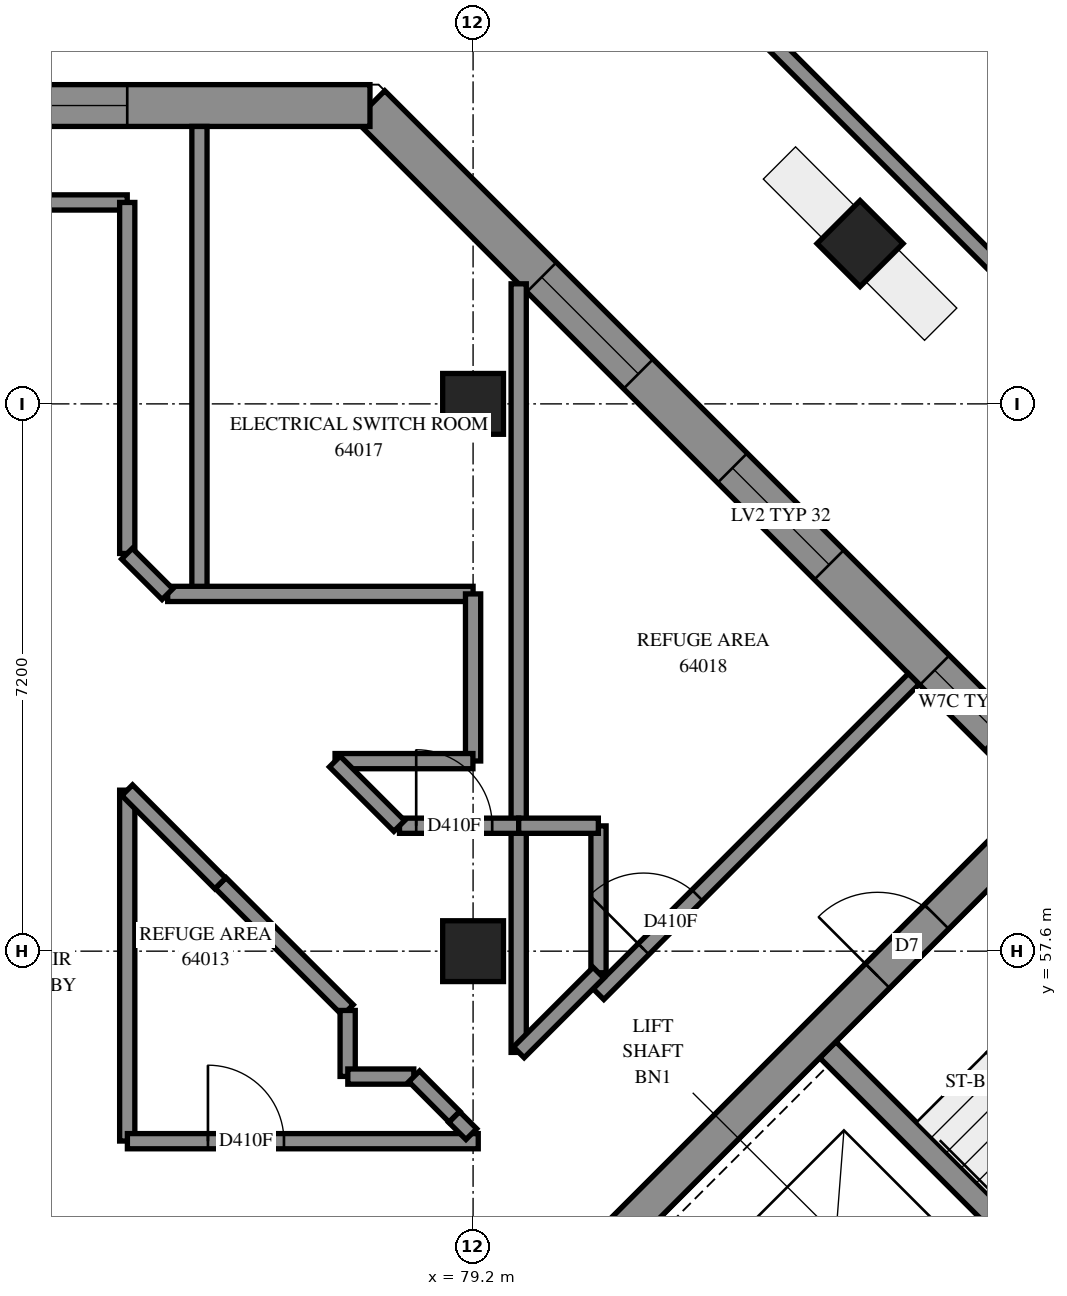
"""IFC4 building model, lengths in metres.
Left out: names, types, materials, properties, quantities, classifications, styles, units other than length and angle.
Written with IfcOpenShell. Run it as: python <this file> out.ifc"""

import sys

from ifc_helpers import new_model, si_unit, direction, frame, frame_2d, origin, origin_2d, place, context, subcontext, project, spatial, polyline, rectangle, outline, extrude, element, fill, save


model = new_model("IFC4")
c1 = context("Model", 3, precision=1e-05, world=origin(), true_north=direction((0.0, 1.0)))
c2 = subcontext(c1, "Body", "Model", "MODEL_VIEW")
j1 = project(units=[si_unit("LENGTHUNIT", "METRE"), si_unit("PLANEANGLEUNIT", "RADIAN")], contexts=[c1])
p1 = place(None, origin())
s1 = spatial("IfcSite", under=j1, at=p1, CompositionType="ELEMENT")
p2 = place(p1, origin())
s2 = spatial("IfcBuilding", under=s1, at=p2, CompositionType="ELEMENT")
p3 = place(p2, frame((0.0, 0.0, 234.6)))
s3 = spatial("IfcBuildingStorey", under=s2, at=p3, CompositionType="ELEMENT", Elevation=234.6)
for number, where, z_axis, x_axis in (
    (1, (79.2, 57.6, 0.0), (0.0, 0.0, 1.0), (1.0, 0.0, 0.0)),
    (2, (79.2, 64.8, 0.0), (0.0, 0.0, 1.0), (1.0, 0.0, 0.0)),
):
    element("IfcColumn", number, at=place(p3, frame(where, z_axis=z_axis, x_axis=x_axis)), inside=s3, PredefinedType="COLUMN", context=c2, shape_type="SweptSolid", body=[
        extrude(rectangle(XDim=0.8, YDim=0.8, at=origin_2d()), origin(), (0.0, 0.0, 1.0), 4.7),
    ])
p4 = place(p3, frame((84.291, 66.909, -0.3), z_axis=(0.0, 0.0, 1.0), x_axis=(0.7071067812, -0.7071067812, 0.0)))
e3 = element("IfcColumn", 3, at=p4, inside=s3, PredefinedType="COLUMN", context=c2, shape_type="SweptSolid", body=[
    extrude(rectangle(XDim=0.8, YDim=0.8, at=origin_2d()), origin(), (0.0, 0.0, 1.0), 5.0),
])
p5 = place(p3, frame((76.495, 49.249, -0.3), z_axis=(0.0, 0.0, 1.0), x_axis=(0.7071067812, 0.7071067812, 0.0)))
e4 = element("IfcWall", 4, at=p5, inside=s3, PredefinedType="SHEAR", context=c2, shape_type="SweptSolid", body=[
    extrude(rectangle(XDim=14.4, YDim=0.45, at=frame_2d((7.2, 0.0))), origin(), (0.0, 0.0, 1.0), 4.3),
])
p6 = place(p5, frame((4.55, 0.0, 0.3)))
e5 = element("IfcOpeningElement", 5, at=p6, cuts=e4, PredefinedType="OPENING", context=c2, shape_type="SweptSolid", body=[
    extrude(rectangle(XDim=1.1, YDim=2.1, at=frame_2d((0.55, 1.05))), frame((0.0, 0.235, 0.0), z_axis=(0.0, -1.0, 0.0), x_axis=(1.0, 0.0, 0.0)), (0.0, 0.0, 1.0), 0.47),
])
p7 = place(p5, frame((11.35, 0.0, 0.3)))
e6 = element("IfcOpeningElement", 6, at=p7, cuts=e4, PredefinedType="OPENING", context=c2, shape_type="SweptSolid", body=[
    extrude(rectangle(XDim=1.1, YDim=2.1, at=frame_2d((0.55, 1.05))), frame((0.0, 0.235, 0.0), z_axis=(0.0, -1.0, 0.0), x_axis=(1.0, 0.0, 0.0)), (0.0, 0.0, 1.0), 0.47),
])
p8 = place(p3, frame((83.867, 56.302, 0.0), z_axis=(0.0, 0.0, 1.0), x_axis=(0.7071137256, -0.7070998367, 0.0)))
e7 = element("IfcWall", 7, at=p8, inside=s3, PredefinedType="SOLIDWALL", context=c2, shape_type="SweptSolid", body=[
    extrude(rectangle(XDim=7.2, YDim=0.3, at=frame_2d((3.6, 0.0))), origin(), (0.0, 0.0, 1.0), 4.7),
])
p9 = place(p3, frame((86.748, 59.82, 0.0), z_axis=(0.0, 0.0, 1.0), x_axis=(-0.7071067812, 0.7071067812, 0.0)))
e8 = element("IfcWall", 8, at=p9, inside=s3, PredefinedType="SOLIDWALL", context=c2, shape_type="SweptSolid", body=[
    extrude(outline(polyline([(0.0, -0.275), (12.707, -0.275), (12.479, 0.275), (0.0, 0.275), (0.0, -0.275)])), origin(), (0.0, 0.0, 1.0), 4.7),
])
p10 = place(p9, frame((4.05, 0.0, 0.9)))
e9 = element("IfcOpeningElement", 9, at=p10, cuts=e8, PredefinedType="OPENING", context=c2, shape_type="SweptSolid", body=[
    extrude(rectangle(XDim=1.8, YDim=3.6, at=frame_2d((0.9, 1.8))), frame((0.0, 0.285, 0.0), z_axis=(0.0, -1.0, 0.0), x_axis=(1.0, 0.0, 0.0)), (0.0, 0.0, 1.0), 0.57),
])
p11 = place(p9, frame((7.6, 0.0, 0.9)))
e10 = element("IfcOpeningElement", 10, at=p11, cuts=e8, PredefinedType="OPENING", context=c2, shape_type="SweptSolid", body=[
    extrude(rectangle(XDim=1.8, YDim=3.6, at=frame_2d((0.9, 1.8))), frame((0.0, 0.285, 0.0), z_axis=(0.0, -1.0, 0.0), x_axis=(1.0, 0.0, 0.0)), (0.0, 0.0, 1.0), 0.57),
])
p12 = place(p9, frame((0.888, 0.0, 0.7)))
e11 = element("IfcOpeningElement", 11, at=p12, cuts=e8, PredefinedType="OPENING", context=c2, shape_type="SweptSolid", body=[
    extrude(rectangle(XDim=1.2, YDim=2.3, at=frame_2d((0.6, 1.15))), frame((0.0, 0.285, 0.0), z_axis=(0.0, -1.0, 0.0), x_axis=(1.0, 0.0, 0.0)), (0.0, 0.0, 1.0), 0.57),
])
p13 = place(p3, frame((77.844, 68.725, 0.0), z_axis=(0.0, 0.0, 1.0), x_axis=(-1.0, 0.0, 0.0)))
e12 = element("IfcWall", 12, at=p13, inside=s3, PredefinedType="SOLIDWALL", context=c2, shape_type="SweptSolid", body=[
    extrude(outline(polyline([(-0.114, -0.275), (46.044, -0.275), (45.493, 0.275), (0.114, 0.275), (-0.114, -0.275)])), origin(), (0.0, 0.0, 1.0), 4.7),
])
p14 = place(p13, frame((3.193, 0.0, 0.9)))
e13 = element("IfcOpeningElement", 13, at=p14, cuts=e12, PredefinedType="OPENING", context=c2, shape_type="SweptSolid", body=[
    extrude(rectangle(XDim=1.8, YDim=3.6, at=frame_2d((0.9, 1.8))), frame((0.0, 0.285, 0.0), z_axis=(0.0, -1.0, 0.0), x_axis=(1.0, 0.0, 0.0)), (0.0, 0.0, 1.0), 0.57),
])
p15 = place(p13, frame((6.744, 0.0, 0.9)))
e14 = element("IfcOpeningElement", 14, at=p15, cuts=e12, PredefinedType="OPENING", context=c2, shape_type="SweptSolid", body=[
    extrude(rectangle(XDim=1.8, YDim=3.6, at=frame_2d((0.9, 1.8))), frame((0.0, 0.285, 0.0), z_axis=(0.0, -1.0, 0.0), x_axis=(1.0, 0.0, 0.0)), (0.0, 0.0, 1.0), 0.57),
])
p16 = place(p13, frame((10.344, 0.0, 0.9)))
e15 = element("IfcOpeningElement", 15, at=p16, cuts=e12, PredefinedType="OPENING", context=c2, shape_type="SweptSolid", body=[
    extrude(rectangle(XDim=1.8, YDim=3.6, at=frame_2d((0.9, 1.8))), frame((0.0, 0.285, 0.0), z_axis=(0.0, -1.0, 0.0), x_axis=(1.0, 0.0, 0.0)), (0.0, 0.0, 1.0), 0.57),
])
p17 = place(p13, frame((13.944, 0.0, 0.9)))
e16 = element("IfcOpeningElement", 16, at=p17, cuts=e12, PredefinedType="OPENING", context=c2, shape_type="SweptSolid", body=[
    extrude(rectangle(XDim=1.8, YDim=3.6, at=frame_2d((0.9, 1.8))), frame((0.0, 0.285, 0.0), z_axis=(0.0, -1.0, 0.0), x_axis=(1.0, 0.0, 0.0)), (0.0, 0.0, 1.0), 0.57),
])
p18 = place(p13, frame((17.544, 0.0, 0.9)))
e17 = element("IfcOpeningElement", 17, at=p18, cuts=e12, PredefinedType="OPENING", context=c2, shape_type="SweptSolid", body=[
    extrude(rectangle(XDim=1.8, YDim=3.6, at=frame_2d((0.9, 1.8))), frame((0.0, 0.285, 0.0), z_axis=(0.0, -1.0, 0.0), x_axis=(1.0, 0.0, 0.0)), (0.0, 0.0, 1.0), 0.57),
])
p19 = place(p13, frame((21.143, 0.0, 0.9)))
e18 = element("IfcOpeningElement", 18, at=p19, cuts=e12, PredefinedType="OPENING", context=c2, shape_type="SweptSolid", body=[
    extrude(rectangle(XDim=1.8, YDim=3.6, at=frame_2d((0.9, 1.8))), frame((0.0, 0.285, 0.0), z_axis=(0.0, -1.0, 0.0), x_axis=(1.0, 0.0, 0.0)), (0.0, 0.0, 1.0), 0.57),
])
p20 = place(p13, frame((24.744, 0.0, 0.9)))
e19 = element("IfcOpeningElement", 19, at=p20, cuts=e12, PredefinedType="OPENING", context=c2, shape_type="SweptSolid", body=[
    extrude(rectangle(XDim=1.8, YDim=3.6, at=frame_2d((0.9, 1.8))), frame((0.0, 0.285, 0.0), z_axis=(0.0, -1.0, 0.0), x_axis=(1.0, 0.0, 0.0)), (0.0, 0.0, 1.0), 0.57),
])
p21 = place(p13, frame((28.343, 0.0, 0.9)))
e20 = element("IfcOpeningElement", 20, at=p21, cuts=e12, PredefinedType="OPENING", context=c2, shape_type="SweptSolid", body=[
    extrude(rectangle(XDim=1.8, YDim=3.6, at=frame_2d((0.9, 1.8))), frame((0.0, 0.285, 0.0), z_axis=(0.0, -1.0, 0.0), x_axis=(1.0, 0.0, 0.0)), (0.0, 0.0, 1.0), 0.57),
])
p22 = place(p13, frame((31.944, 0.0, 0.9)))
e21 = element("IfcOpeningElement", 21, at=p22, cuts=e12, PredefinedType="OPENING", context=c2, shape_type="SweptSolid", body=[
    extrude(rectangle(XDim=1.8, YDim=3.6, at=frame_2d((0.9, 1.8))), frame((0.0, 0.285, 0.0), z_axis=(0.0, -1.0, 0.0), x_axis=(1.0, 0.0, 0.0)), (0.0, 0.0, 1.0), 0.57),
])
p23 = place(p13, frame((35.544, 0.0, 0.9)))
e22 = element("IfcOpeningElement", 22, at=p23, cuts=e12, PredefinedType="OPENING", context=c2, shape_type="SweptSolid", body=[
    extrude(rectangle(XDim=1.8, YDim=3.6, at=frame_2d((0.9, 1.8))), frame((0.0, 0.285, 0.0), z_axis=(0.0, -1.0, 0.0), x_axis=(1.0, 0.0, 0.0)), (0.0, 0.0, 1.0), 0.57),
])
p24 = place(p3, frame((102.747, 49.938, 0.0), z_axis=(0.0, 0.0, 1.0), x_axis=(-0.7071083109, 0.7071052514, 0.0)))
e23 = element("IfcWall", 23, at=p24, inside=s3, PredefinedType="SOLIDWALL", context=c2, shape_type="SweptSolid", body=[
    extrude(outline(polyline([(-0.1, -0.1), (32.726, -0.1), (32.644, 0.1), (0.1, 0.1), (-0.1, -0.1)])), origin(), (0.0, 0.0, 1.0), 4.7),
])
p25 = place(p3, frame((54.95, 67.45, 0.0), z_axis=(0.0, 0.0, 1.0), x_axis=(1.0, 0.0, 0.0)))
e24 = element("IfcWall", 24, at=p25, inside=s3, PredefinedType="PARTITIONING", context=c2, shape_type="SweptSolid", body=[
    extrude(rectangle(XDim=19.7, YDim=0.2, at=frame_2d((9.85, 0.0))), origin(), (0.0, 0.0, 1.0), 4.7),
])
p26 = place(p3, frame((79.8, 59.25, 0.0), z_axis=(0.0, 0.0, 1.0), x_axis=(0.0, 1.0, 0.0)))
e25 = element("IfcWall", 25, at=p26, inside=s3, PredefinedType="PARTITIONING", context=c2, shape_type="SweptSolid", body=[
    extrude(rectangle(XDim=7.13, YDim=0.2, at=frame_2d((3.565, 0.0))), origin(), (0.0, 0.0, 1.0), 4.7),
])
p27 = place(p3, frame((75.6, 62.3, 0.0), z_axis=(0.0, 0.0, 1.0), x_axis=(0.0, 1.0, 0.0)))
e26 = element("IfcWall", 26, at=p27, inside=s3, PredefinedType="PARTITIONING", context=c2, shape_type="SweptSolid", body=[
    extrude(rectangle(XDim=6.15, YDim=0.2, at=frame_2d((3.075, 0.0))), origin(), (0.0, 0.0, 1.0), 4.7),
])
p28 = place(p3, frame((80.85, 57.034, 0.0), z_axis=(0.0, 0.0, 1.0), x_axis=(0.7071067812, 0.7071067812, 0.0)))
e27 = element("IfcWall", 27, at=p28, inside=s3, PredefinedType="PARTITIONING", context=c2, shape_type="SweptSolid", body=[
    extrude(rectangle(XDim=5.866, YDim=0.2, at=frame_2d((2.933, 0.0))), origin(), (0.0, 0.0, 1.0), 4.7),
])
p29 = place(p28, frame((0.839, 0.0, 0.0)))
e28 = element("IfcOpeningElement", 28, at=p29, cuts=e27, PredefinedType="OPENING", context=c2, shape_type="SweptSolid", body=[
    extrude(rectangle(XDim=1.0, YDim=2.1, at=frame_2d((0.5, 1.05))), frame((0.0, 0.11, 0.0), z_axis=(0.0, -1.0, 0.0), x_axis=(1.0, 0.0, 0.0)), (0.0, 0.0, 1.0), 0.22),
])
p30 = place(p3, frame((74.65, 62.832, 0.0), z_axis=(0.0, 0.0, 1.0), x_axis=(0.0, 1.0, 0.0)))
e29 = element("IfcWall", 29, at=p30, inside=s3, PredefinedType="PARTITIONING", context=c2, shape_type="SweptSolid", body=[
    extrude(rectangle(XDim=4.618, YDim=0.2, at=frame_2d((2.309, 0.0))), origin(), (0.0, 0.0, 1.0), 4.7),
])
p31 = place(p3, frame((74.65, 55.102, 0.0), z_axis=(0.0, 0.0, 1.0), x_axis=(0.0, 1.0, 0.0)))
e30 = element("IfcWall", 30, at=p31, inside=s3, PredefinedType="PARTITIONING", context=c2, shape_type="SweptSolid", body=[
    extrude(rectangle(XDim=4.616, YDim=0.2, at=frame_2d((2.308, 0.0))), origin(), (0.0, 0.0, 1.0), 4.7),
])
p32 = place(p3, frame((74.652, 55.1, 0.0), z_axis=(0.0, 0.0, 1.0), x_axis=(1.0, 0.0, 0.0)))
e31 = element("IfcWall", 31, at=p32, inside=s3, PredefinedType="PARTITIONING", context=c2, shape_type="SweptSolid", body=[
    extrude(rectangle(XDim=4.616, YDim=0.2, at=frame_2d((2.308, 0.0))), origin(), (0.0, 0.0, 1.0), 4.7),
])
p33 = place(p32, frame((1.06, 0.0, 0.0)))
e32 = element("IfcOpeningElement", 32, at=p33, cuts=e31, PredefinedType="OPENING", context=c2, shape_type="SweptSolid", body=[
    extrude(rectangle(XDim=1.0, YDim=2.1, at=frame_2d((0.5, 1.05))), frame((0.0, 0.11, 0.0), z_axis=(0.0, -1.0, 0.0), x_axis=(1.0, 0.0, 0.0)), (0.0, 0.0, 1.0), 0.22),
])
p34 = place(p3, frame((75.182, 62.3, 0.0), z_axis=(0.0, 0.0, 1.0), x_axis=(1.0, 0.0, 0.0)))
e33 = element("IfcWall", 33, at=p34, inside=s3, PredefinedType="PARTITIONING", context=c2, shape_type="SweptSolid", body=[
    extrude(rectangle(XDim=4.018, YDim=0.2, at=frame_2d((2.009, 0.0))), origin(), (0.0, 0.0, 1.0), 4.7),
])
p35 = place(p3, frame((79.8, 56.268, 0.0), z_axis=(0.0, 0.0, 1.0), x_axis=(0.0, 1.0, 0.0)))
e34 = element("IfcWall", 34, at=p35, inside=s3, PredefinedType="PARTITIONING", context=c2, shape_type="SweptSolid", body=[
    extrude(rectangle(XDim=2.982, YDim=0.2, at=frame_2d((1.491, 0.0))), origin(), (0.0, 0.0, 1.0), 4.7),
])
p36 = place(p3, frame((75.878, 58.496, 0.0), z_axis=(0.0, 0.0, 1.0), x_axis=(0.7075293128, -0.706683997, 0.0)))
e35 = element("IfcWall", 35, at=p36, inside=s3, PredefinedType="PARTITIONING", context=c2, shape_type="SweptSolid", body=[
    extrude(rectangle(XDim=2.366, YDim=0.2, at=frame_2d((1.183, 0.0))), origin(), (0.0, 0.0, 1.0), 4.7),
])
p37 = place(p3, frame((79.2, 60.102, 0.0), z_axis=(0.0, 0.0, 1.0), x_axis=(0.0, 1.0, 0.0)))
e36 = element("IfcWall", 36, at=p37, inside=s3, PredefinedType="PARTITIONING", context=c2, shape_type="SweptSolid", body=[
    extrude(rectangle(XDim=2.198, YDim=0.2, at=frame_2d((1.099, 0.0))), origin(), (0.0, 0.0, 1.0), 4.7),
])
p38 = place(p3, frame((80.85, 57.316, 0.0), z_axis=(0.0, 0.0, 1.0), x_axis=(0.0, 1.0, 0.0)))
e37 = element("IfcWall", 37, at=p38, inside=s3, PredefinedType="PARTITIONING", context=c2, shape_type="SweptSolid", body=[
    extrude(rectangle(XDim=1.932, YDim=0.2, at=frame_2d((0.966, 0.0))), origin(), (0.0, 0.0, 1.0), 4.7),
])
p39 = place(p3, frame((77.384, 60.1, 0.0), z_axis=(0.0, 0.0, 1.0), x_axis=(1.0, 0.0, 0.0)))
e38 = element("IfcWall", 38, at=p39, inside=s3, PredefinedType="PARTITIONING", context=c2, shape_type="SweptSolid", body=[
    extrude(rectangle(XDim=1.814, YDim=0.2, at=frame_2d((0.907, 0.0))), origin(), (0.0, 0.0, 1.0), 4.7),
])
p40 = place(p3, frame((74.649, 59.717, 0.0), z_axis=(0.0, 0.0, 1.0), x_axis=(0.7065293157, -0.7076837754, 0.0)))
e39 = element("IfcWall", 39, at=p40, inside=s3, PredefinedType="PARTITIONING", context=c2, shape_type="SweptSolid", body=[
    extrude(rectangle(XDim=1.732, YDim=0.2, at=frame_2d((0.866, 0.0))), origin(), (0.0, 0.0, 1.0), 4.7),
])
p41 = place(p3, frame((78.232, 59.25, 0.0), z_axis=(0.0, 0.0, 1.0), x_axis=(1.0, 0.0, 0.0)))
e40 = element("IfcWall", 40, at=p41, inside=s3, PredefinedType="PARTITIONING", context=c2, shape_type="SweptSolid", body=[
    extrude(rectangle(XDim=1.568, YDim=0.2, at=frame_2d((0.784, 0.0))), origin(), (0.0, 0.0, 1.0), 4.7),
])
p42 = place(p41, frame((0.22, 0.0, 0.0)))
e41 = element("IfcOpeningElement", 41, at=p42, cuts=e40, PredefinedType="OPENING", context=c2, shape_type="SweptSolid", body=[
    extrude(rectangle(XDim=1.0, YDim=2.1, at=frame_2d((0.5, 1.05))), frame((0.0, 0.11, 0.0), z_axis=(0.0, -1.0, 0.0), x_axis=(1.0, 0.0, 0.0)), (0.0, 0.0, 1.0), 0.22),
])
p43 = place(p3, frame((79.801, 56.269, 0.0), z_axis=(0.0, 0.0, 1.0), x_axis=(0.7071067812, 0.7071067812, 0.0)))
e42 = element("IfcWall", 42, at=p43, inside=s3, PredefinedType="PARTITIONING", context=c2, shape_type="SweptSolid", body=[
    extrude(rectangle(XDim=1.482, YDim=0.2, at=frame_2d((0.741, 0.0))), origin(), (0.0, 0.0, 1.0), 4.7),
])
p44 = place(p3, frame((77.381, 60.095, 0.0), z_axis=(0.0, 0.0, 1.0), x_axis=(0.7071067812, -0.7071067812, 0.0)))
e43 = element("IfcWall", 43, at=p44, inside=s3, PredefinedType="PARTITIONING", context=c2, shape_type="SweptSolid", body=[
    extrude(rectangle(XDim=1.199, YDim=0.2, at=frame_2d((0.6, 0.0))), origin(), (0.0, 0.0, 1.0), 4.7),
])
p45 = place(p3, frame((79.8, 59.25, 0.0), z_axis=(0.0, 0.0, 1.0), x_axis=(1.0, 0.0, 0.0)))
e44 = element("IfcWall", 44, at=p45, inside=s3, PredefinedType="PARTITIONING", context=c2, shape_type="SweptSolid", body=[
    extrude(rectangle(XDim=1.048, YDim=0.2, at=frame_2d((0.524, 0.0))), origin(), (0.0, 0.0, 1.0), 4.7),
])
for number, where, z_axis, x_axis in (
    (45, (77.55, 55.952, 0.0), (0.0, 0.0, 1.0), (0.0, 1.0, 0.0)),
    (46, (77.552, 55.95, 0.0), (0.0, 0.0, 1.0), (1.0, 0.0, 0.0)),
):
    element("IfcWall", number, at=place(p3, frame(where, z_axis=z_axis, x_axis=x_axis)), inside=s3, PredefinedType="PARTITIONING", context=c2, shape_type="SweptSolid", body=[
        extrude(rectangle(XDim=0.868, YDim=0.2, at=frame_2d((0.434, 0.0))), origin(), (0.0, 0.0, 1.0), 4.7),
    ])
p46 = place(p3, frame((74.647, 62.829, 0.0), z_axis=(0.0, 0.0, 1.0), x_axis=(0.7071067812, -0.7071067812, 0.0)))
e47 = element("IfcWall", 47, at=p46, inside=s3, PredefinedType="PARTITIONING", context=c2, shape_type="SweptSolid", body=[
    extrude(rectangle(XDim=0.752, YDim=0.2, at=frame_2d((0.376, 0.0))), origin(), (0.0, 0.0, 1.0), 4.7),
])
p47 = place(p3, frame((78.425, 55.953, 0.0), z_axis=(0.0, 0.0, 1.0), x_axis=(0.7057738785, -0.7084371761, 0.0)))
e48 = element("IfcWall", 48, at=p47, inside=s3, PredefinedType="PARTITIONING", context=c2, shape_type="SweptSolid", body=[
    extrude(rectangle(XDim=0.751, YDim=0.2, at=frame_2d((0.376, 0.0))), origin(), (0.0, 0.0, 1.0), 4.7),
])
p48 = place(p3, frame((78.951, 55.417, 0.0), z_axis=(0.0, 0.0, 1.0), x_axis=(0.709302262, -0.7049044624, 0.0)))
e49 = element("IfcWall", 49, at=p48, inside=s3, PredefinedType="PARTITIONING", context=c2, shape_type="SweptSolid", body=[
    extrude(rectangle(XDim=0.318, YDim=0.2, at=frame_2d((0.159, 0.0))), origin(), (0.0, 0.0, 1.0), 4.7),
])
p49 = place(p10, origin())
e50 = element("IfcWindow", 50, at=p49, inside=s3, PartitioningType="SINGLE_PANEL", PredefinedType="WINDOW", context=c2, shape_type="SweptSolid", body=[
    extrude(rectangle(XDim=1.8, YDim=3.6, at=frame_2d((0.9, 1.8))), frame((0.0, 0.155, 0.0), z_axis=(0.0, -1.0, 0.0), x_axis=(1.0, 0.0, 0.0)), (0.0, 0.0, 1.0), 0.06),
])
fill(e9, e50)
p50 = place(p11, origin())
e51 = element("IfcWindow", 51, at=p50, inside=s3, PartitioningType="SINGLE_PANEL", PredefinedType="WINDOW", context=c2, shape_type="SweptSolid", body=[
    extrude(rectangle(XDim=1.8, YDim=3.6, at=frame_2d((0.9, 1.8))), frame((0.0, 0.155, 0.0), z_axis=(0.0, -1.0, 0.0), x_axis=(1.0, 0.0, 0.0)), (0.0, 0.0, 1.0), 0.06),
])
fill(e10, e51)
p51 = place(p14, origin())
e52 = element("IfcWindow", 52, at=p51, inside=s3, PartitioningType="SINGLE_PANEL", PredefinedType="WINDOW", context=c2, shape_type="SweptSolid", body=[
    extrude(rectangle(XDim=1.8, YDim=3.6, at=frame_2d((0.9, 1.8))), frame((0.0, 0.155, 0.0), z_axis=(0.0, -1.0, 0.0), x_axis=(1.0, 0.0, 0.0)), (0.0, 0.0, 1.0), 0.06),
])
fill(e13, e52)
p52 = place(p7, origin())
e53 = element("IfcDoor", 53, at=p52, inside=s3, OperationType="SINGLE_SWING_LEFT", PredefinedType="DOOR", context=c2, shape_type="SweptSolid", body=[
    extrude(rectangle(XDim=1.1, YDim=2.1, at=frame_2d((0.55, 1.05))), frame((0.0, 0.025, 0.0), z_axis=(0.0, -1.0, 0.0), x_axis=(1.0, 0.0, 0.0)), (0.0, 0.0, 1.0), 0.05),
])
fill(e6, e53)
p53 = place(p33, origin())
e54 = element("IfcDoor", 54, at=p53, inside=s3, OperationType="SINGLE_SWING_LEFT", PredefinedType="DOOR", context=c2, shape_type="SweptSolid", body=[
    extrude(rectangle(XDim=1.0, YDim=2.1, at=frame_2d((0.5, 1.05))), frame((0.0, 0.025, 0.0), z_axis=(0.0, -1.0, 0.0), x_axis=(1.0, 0.0, 0.0)), (0.0, 0.0, 1.0), 0.05),
])
fill(e32, e54)
p54 = place(p42, origin())
e55 = element("IfcDoor", 55, at=p54, inside=s3, OperationType="SINGLE_SWING_LEFT", PredefinedType="DOOR", context=c2, shape_type="SweptSolid", body=[
    extrude(rectangle(XDim=1.0, YDim=2.1, at=frame_2d((0.5, 1.05))), frame((0.0, 0.025, 0.0), z_axis=(0.0, -1.0, 0.0), x_axis=(1.0, 0.0, 0.0)), (0.0, 0.0, 1.0), 0.05),
])
fill(e41, e55)
p55 = place(p29, origin())
e56 = element("IfcDoor", 56, at=p55, inside=s3, OperationType="SINGLE_SWING_RIGHT", PredefinedType="DOOR", context=c2, shape_type="SweptSolid", body=[
    extrude(rectangle(XDim=1.0, YDim=2.1, at=frame_2d((0.5, 1.05))), frame((0.0, 0.025, 0.0), z_axis=(0.0, -1.0, 0.0), x_axis=(1.0, 0.0, 0.0)), (0.0, 0.0, 1.0), 0.05),
])
fill(e28, e56)
p56 = place(p12, origin())
e57 = element("IfcWindow", 57, at=p56, inside=s3, PartitioningType="SINGLE_PANEL", PredefinedType="WINDOW", context=c2, shape_type="SweptSolid", body=[
    extrude(rectangle(XDim=1.2, YDim=2.3, at=frame_2d((0.6, 1.15))), frame((0.0, 0.155, 0.0), z_axis=(0.0, -1.0, 0.0), x_axis=(1.0, 0.0, 0.0)), (0.0, 0.0, 1.0), 0.06),
])
fill(e11, e57)
save(model, sys.argv[1])
